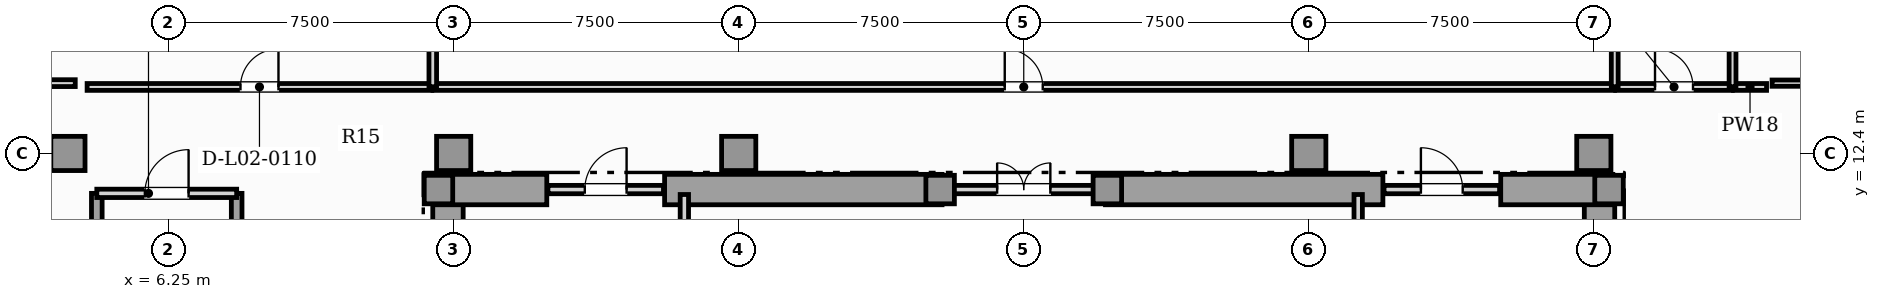
"""IFC4 building model, lengths in metres.
Left out: names, types, materials, properties, quantities, classifications, styles, units other than length and angle.
Written with IfcOpenShell. Run it as: python <this file> out.ifc"""

import sys

from ifc_helpers import new_model, si_unit, direction, frame, frame_2d, origin, origin_2d, place, context, subcontext, project, spatial, rectangle, extrude, element, fill, save


model = new_model("IFC4")
c1 = context("Model", 3, precision=1e-05, world=origin(), true_north=direction((0.0, 1.0)))
c2 = subcontext(c1, "Body", "Model", "MODEL_VIEW")
j1 = project(units=[si_unit("LENGTHUNIT", "METRE"), si_unit("PLANEANGLEUNIT", "RADIAN")], contexts=[c1])
p1 = place(None, origin())
s1 = spatial("IfcSite", under=j1, at=p1, CompositionType="ELEMENT")
p2 = place(p1, origin())
s2 = spatial("IfcBuilding", under=s1, at=p2, CompositionType="ELEMENT")
p3 = place(p2, frame((0.0, 0.0, 10.2)))
s3 = spatial("IfcBuildingStorey", under=s2, at=p3, CompositionType="ELEMENT", Elevation=10.2)
for number, where, z_axis, x_axis in (
    (1, (13.6, 0.92, 0.0), (0.0, 0.0, 1.0), (0.0, 1.0, 0.0)),
    (2, (43.9, 0.92, 0.0), (0.0, 0.0, 1.0), (0.0, 1.0, 0.0)),
):
    element("IfcWall", number, at=place(p3, frame(where, z_axis=z_axis, x_axis=x_axis)), inside=s3, PredefinedType="SHEAR", context=c2, shape_type="SweptSolid", body=[
        extrude(rectangle(XDim=10.53, YDim=0.8, at=frame_2d((5.265, 0.0))), origin(), (0.0, 0.0, 1.0), 4.52),
    ])
p4 = place(p3, frame((13.25, 11.45, 0.0), z_axis=(0.0, 0.0, 1.0), x_axis=(1.0, 0.0, 0.0)))
e3 = element("IfcWall", 3, at=p4, inside=s3, PredefinedType="SHEAR", context=c2, shape_type="SweptSolid", body=[
    extrude(rectangle(XDim=2.95, YDim=0.8, at=frame_2d((1.475, 0.0))), origin(), (0.0, 0.0, 1.0), 4.52),
])
for number, where, z_axis, x_axis in (
    (4, (19.3, 11.45, 0.0), (0.0, 0.0, 1.0), (1.0, 0.0, 0.0)),
    (5, (30.9, 11.45, 0.0), (0.0, 0.0, 1.0), (1.0, 0.0, 0.0)),
):
    element("IfcWall", number, at=place(p3, frame(where, z_axis=z_axis, x_axis=x_axis)), inside=s3, PredefinedType="SHEAR", context=c2, shape_type="SweptSolid", body=[
        extrude(rectangle(XDim=7.3, YDim=0.8, at=frame_2d((3.65, 0.0))), origin(), (0.0, 0.0, 1.0), 4.52),
    ])
p5 = place(p3, frame((41.3, 11.45, 0.0), z_axis=(0.0, 0.0, 1.0), x_axis=(1.0, 0.0, 0.0)))
e6 = element("IfcWall", 6, at=p5, inside=s3, PredefinedType="SHEAR", context=c2, shape_type="SweptSolid", body=[
    extrude(rectangle(XDim=2.95, YDim=0.8, at=frame_2d((1.475, 0.0))), origin(), (0.0, 0.0, 1.0), 4.52),
])
for number, where, z_axis, x_axis in (
    (7, (13.35, 11.45, 0.0), (0.0, 0.0, 1.0), (1.0, 0.0, 0.0)),
    (8, (44.15, 11.45, 0.0), (0.0, 0.0, 1.0), (1.0, 0.0, 0.0)),
    (9, (26.55, 11.45, 0.0), (0.0, 0.0, 1.0), (1.0, 0.0, 0.0)),
    (10, (30.95, 11.45, 0.0), (0.0, 0.0, 1.0), (1.0, 0.0, 0.0)),
):
    element("IfcColumn", number, at=place(p3, frame(where, z_axis=z_axis, x_axis=x_axis)), inside=s3, PredefinedType="COLUMN", context=c2, shape_type="SweptSolid", body=[
        extrude(rectangle(XDim=0.75, YDim=0.75, at=origin_2d()), origin(), (0.0, 0.0, 1.0), 4.8),
    ])
for number, where, z_axis, x_axis in (
    (11, (3.6, 12.4, 0.0), (0.0, 0.0, 1.0), (1.0, 0.0, 0.0)),
    (12, (13.75, 12.4, 0.0), (0.0, 0.0, 1.0), (1.0, 0.0, 0.0)),
    (13, (43.75, 12.4, 0.0), (0.0, 0.0, 1.0), (1.0, 0.0, 0.0)),
    (14, (21.25, 12.4, 0.0), (0.0, 0.0, 1.0), (1.0, 0.0, 0.0)),
    (15, (36.25, 12.4, 0.0), (0.0, 0.0, 1.0), (1.0, 0.0, 0.0)),
):
    element("IfcColumn", number, at=place(p3, frame(where, z_axis=z_axis, x_axis=x_axis)), inside=s3, PredefinedType="COLUMN", context=c2, shape_type="SweptSolid", body=[
        extrude(rectangle(XDim=0.9, YDim=0.9, at=origin_2d()), origin(), (0.0, 0.0, 1.0), 4.8),
    ])
for number, where, z_axis, x_axis in (
    (16, (4.36, 3.56, 0.0), (0.0, 0.0, 1.0), (0.0, 1.0, 0.0)),
    (17, (8.04, 3.56, 0.0), (0.0, 0.0, 1.0), (0.0, 1.0, 0.0)),
):
    element("IfcWall", number, at=place(p3, frame(where, z_axis=z_axis, x_axis=x_axis)), inside=s3, PredefinedType="SHEAR", context=c2, shape_type="SweptSolid", body=[
        extrude(rectangle(XDim=7.79, YDim=0.28, at=frame_2d((3.895, 0.0))), origin(), (0.0, 0.0, 1.0), 4.52),
    ])
p6 = place(p3, frame((4.36, 11.35, 0.0), z_axis=(0.0, 0.0, 1.0), x_axis=(1.0, 0.0, 0.0)))
e18 = element("IfcWall", 18, at=p6, inside=s3, PredefinedType="SOLIDWALL", context=c2, shape_type="SweptSolid", body=[
    extrude(rectangle(XDim=3.68, YDim=0.22, at=frame_2d((1.84, 0.0))), origin(), (0.0, 0.0, 1.0), 4.52),
])
p7 = place(p6, frame((1.265, 0.0, 0.0)))
e19 = element("IfcOpeningElement", 19, at=p7, cuts=e18, PredefinedType="OPENING", context=c2, shape_type="SweptSolid", body=[
    extrude(rectangle(XDim=1.15, YDim=2.2, at=frame_2d((0.575, 1.1))), frame((0.0, 0.12, 0.0), z_axis=(0.0, -1.0, 0.0), x_axis=(1.0, 0.0, 0.0)), (0.0, 0.0, 1.0), 0.24),
])
p8 = place(p3, frame((19.82, 8.52, 0.0), z_axis=(0.0, 0.0, 1.0), x_axis=(0.0, 1.0, 0.0)))
e20 = element("IfcWall", 20, at=p8, inside=s3, PredefinedType="SOLIDWALL", context=c2, shape_type="SweptSolid", body=[
    extrude(rectangle(XDim=2.8, YDim=0.22, at=frame_2d((1.4, 0.0))), origin(), (0.0, 0.0, 1.0), 3.976),
])
p9 = place(p8, frame((0.85, 0.0, 0.0)))
e21 = element("IfcOpeningElement", 21, at=p9, cuts=e20, PredefinedType="OPENING", context=c2, shape_type="SweptSolid", body=[
    extrude(rectangle(XDim=1.1, YDim=2.2, at=frame_2d((0.55, 1.1))), frame((0.0, 0.12, 0.0), z_axis=(0.0, -1.0, 0.0), x_axis=(1.0, 0.0, 0.0)), (0.0, 0.0, 1.0), 0.24),
])
p10 = place(p3, frame((37.55, 8.52, 0.0), z_axis=(0.0, 0.0, 1.0), x_axis=(0.0, 1.0, 0.0)))
e22 = element("IfcWall", 22, at=p10, inside=s3, PredefinedType="SOLIDWALL", context=c2, shape_type="SweptSolid", body=[
    extrude(rectangle(XDim=2.8, YDim=0.22, at=frame_2d((1.4, 0.0))), origin(), (0.0, 0.0, 1.0), 3.976),
])
p11 = place(p10, frame((0.85, 0.0, 0.0)))
e23 = element("IfcOpeningElement", 23, at=p11, cuts=e22, PredefinedType="OPENING", context=c2, shape_type="SweptSolid", body=[
    extrude(rectangle(XDim=1.1, YDim=2.2, at=frame_2d((0.55, 1.1))), frame((0.0, 0.12, 0.0), z_axis=(0.0, -1.0, 0.0), x_axis=(1.0, 0.0, 0.0)), (0.0, 0.0, 1.0), 0.24),
])
p12 = place(p3, frame((16.23, 11.45, 0.0), z_axis=(0.0, 0.0, 1.0), x_axis=(1.0, 0.0, 0.0)))
e24 = element("IfcWall", 24, at=p12, inside=s3, PredefinedType="SOLIDWALL", context=c2, shape_type="SweptSolid", body=[
    extrude(rectangle(XDim=3.04, YDim=0.22, at=frame_2d((1.52, 0.0))), origin(), (0.0, 0.0, 1.0), 4.52),
])
p13 = place(p12, frame((0.97, 0.0, 0.0)))
e25 = element("IfcOpeningElement", 25, at=p13, cuts=e24, PredefinedType="OPENING", context=c2, shape_type="SweptSolid", body=[
    extrude(rectangle(XDim=1.1, YDim=2.2, at=frame_2d((0.55, 1.1))), frame((0.0, 0.12, 0.0), z_axis=(0.0, -1.0, 0.0), x_axis=(1.0, 0.0, 0.0)), (0.0, 0.0, 1.0), 0.24),
])
p14 = place(p3, frame((26.63, 11.45, 0.0), z_axis=(0.0, 0.0, 1.0), x_axis=(1.0, 0.0, 0.0)))
e26 = element("IfcWall", 26, at=p14, inside=s3, PredefinedType="SOLIDWALL", context=c2, shape_type="SweptSolid", body=[
    extrude(rectangle(XDim=4.24, YDim=0.22, at=frame_2d((2.12, 0.0))), origin(), (0.0, 0.0, 1.0), 4.52),
])
p15 = place(p14, frame((1.42, 0.0, 0.0)))
e27 = element("IfcOpeningElement", 27, at=p15, cuts=e26, PredefinedType="OPENING", context=c2, shape_type="SweptSolid", body=[
    extrude(rectangle(XDim=1.4, YDim=2.2, at=frame_2d((0.7, 1.1))), frame((0.0, 0.12, 0.0), z_axis=(0.0, -1.0, 0.0), x_axis=(1.0, 0.0, 0.0)), (0.0, 0.0, 1.0), 0.24),
])
p16 = place(p3, frame((38.23, 11.45, 0.0), z_axis=(0.0, 0.0, 1.0), x_axis=(1.0, 0.0, 0.0)))
e28 = element("IfcWall", 28, at=p16, inside=s3, PredefinedType="SOLIDWALL", context=c2, shape_type="SweptSolid", body=[
    extrude(rectangle(XDim=3.04, YDim=0.22, at=frame_2d((1.52, 0.0))), origin(), (0.0, 0.0, 1.0), 4.52),
])
p17 = place(p16, frame((0.97, 0.0, 0.0)))
e29 = element("IfcOpeningElement", 29, at=p17, cuts=e28, PredefinedType="OPENING", context=c2, shape_type="SweptSolid", body=[
    extrude(rectangle(XDim=1.1, YDim=2.2, at=frame_2d((0.55, 1.1))), frame((0.0, 0.12, 0.0), z_axis=(0.0, -1.0, 0.0), x_axis=(1.0, 0.0, 0.0)), (0.0, 0.0, 1.0), 0.24),
])
p18 = place(p3, frame((13.205, 14.15, 0.0), z_axis=(0.0, 0.0, 1.0), x_axis=(1.0, 0.0, 0.0)))
e30 = element("IfcWall", 30, at=p18, inside=s3, PredefinedType="PARTITIONING", context=c2, shape_type="SweptSolid", body=[
    extrude(rectangle(XDim=31.09, YDim=0.18, at=frame_2d((15.545, 0.0))), origin(), (0.0, 0.0, 1.0), 4.52),
])
p19 = place(p18, frame((15.045, 0.0, 0.0)))
e31 = element("IfcOpeningElement", 31, at=p19, cuts=e30, PredefinedType="OPENING", context=c2, shape_type="SweptSolid", body=[
    extrude(rectangle(XDim=1.0, YDim=2.15, at=frame_2d((0.5, 1.075))), frame((0.0, 0.1, 0.0), z_axis=(0.0, -1.0, 0.0), x_axis=(1.0, 0.0, 0.0)), (0.0, 0.0, 1.0), 0.2),
])
p20 = place(p3, frame((4.105, 14.15, 0.0), z_axis=(0.0, 0.0, 1.0), x_axis=(1.0, 0.0, 0.0)))
e32 = element("IfcWall", 32, at=p20, inside=s3, PredefinedType="PARTITIONING", context=c2, shape_type="SweptSolid", body=[
    extrude(rectangle(XDim=9.07, YDim=0.18, at=frame_2d((4.535, 0.0))), origin(), (0.0, 0.0, 1.0), 4.52),
])
p21 = place(p20, frame((4.035, 0.0, 0.0)))
e33 = element("IfcOpeningElement", 33, at=p21, cuts=e32, PredefinedType="OPENING", context=c2, shape_type="SweptSolid", body=[
    extrude(rectangle(XDim=1.0, YDim=2.15, at=frame_2d((0.5, 1.075))), frame((0.0, 0.1, 0.0), z_axis=(0.0, -1.0, 0.0), x_axis=(1.0, 0.0, 0.0)), (0.0, 0.0, 1.0), 0.2),
])
p22 = place(p3, frame((44.325, 14.15, 0.0), z_axis=(0.0, 0.0, 1.0), x_axis=(1.0, 0.0, 0.0)))
e34 = element("IfcWall", 34, at=p22, inside=s3, PredefinedType="PARTITIONING", context=c2, shape_type="SweptSolid", body=[
    extrude(rectangle(XDim=3.07, YDim=0.18, at=frame_2d((1.535, 0.0))), origin(), (0.0, 0.0, 1.0), 4.52),
])
p23 = place(p22, frame((1.035, 0.0, 0.0)))
e35 = element("IfcOpeningElement", 35, at=p23, cuts=e34, PredefinedType="OPENING", context=c2, shape_type="SweptSolid", body=[
    extrude(rectangle(XDim=1.0, YDim=2.15, at=frame_2d((0.5, 1.075))), frame((0.0, 0.1, 0.0), z_axis=(0.0, -1.0, 0.0), x_axis=(1.0, 0.0, 0.0)), (0.0, 0.0, 1.0), 0.2),
])
p24 = place(p3, frame((47.425, 14.15, 0.0), z_axis=(0.0, 0.0, 1.0), x_axis=(1.0, 0.0, 0.0)))
e36 = element("IfcWall", 36, at=p24, inside=s3, PredefinedType="PARTITIONING", context=c2, shape_type="SweptSolid", body=[
    extrude(rectangle(XDim=0.87, YDim=0.18, at=frame_2d((0.435, 0.0))), origin(), (0.0, 0.0, 1.0), 4.52),
])
p25 = place(p3, frame((13.2, 14.155, 0.0), z_axis=(0.0, 0.0, 1.0), x_axis=(0.0, 1.0, 0.0)))
e37 = element("IfcWall", 37, at=p25, inside=s3, PredefinedType="PARTITIONING", context=c2, shape_type="SweptSolid", body=[
    extrude(rectangle(XDim=11.54, YDim=0.2, at=frame_2d((5.77, 0.0))), origin(), (0.0, 0.0, 1.0), 4.52),
])
p26 = place(p3, frame((44.3, 14.155, 0.0), z_axis=(0.0, 0.0, 1.0), x_axis=(0.0, 1.0, 0.0)))
e38 = element("IfcWall", 38, at=p26, inside=s3, PredefinedType="PARTITIONING", context=c2, shape_type="SweptSolid", body=[
    extrude(rectangle(XDim=11.54, YDim=0.18, at=frame_2d((5.77, 0.0))), origin(), (0.0, 0.0, 1.0), 4.52),
])
p27 = place(p26, frame((5.27, 0.0, 0.0)))
e39 = element("IfcOpeningElement", 39, at=p27, cuts=e38, PredefinedType="OPENING", context=c2, shape_type="SweptSolid", body=[
    extrude(rectangle(XDim=1.0, YDim=2.15, at=frame_2d((0.5, 1.075))), frame((0.0, 0.1, 0.0), z_axis=(0.0, -1.0, 0.0), x_axis=(1.0, 0.0, 0.0)), (0.0, 0.0, 1.0), 0.2),
])
p28 = place(p3, frame((47.4, 14.155, 0.0), z_axis=(0.0, 0.0, 1.0), x_axis=(0.0, 1.0, 0.0)))
e40 = element("IfcWall", 40, at=p28, inside=s3, PredefinedType="PARTITIONING", context=c2, shape_type="SweptSolid", body=[
    extrude(rectangle(XDim=3.79, YDim=0.18, at=frame_2d((1.895, 0.0))), origin(), (0.0, 0.0, 1.0), 4.52),
])
p29 = place(p28, frame((1.37, 0.0, 0.0)))
e41 = element("IfcOpeningElement", 41, at=p29, cuts=e40, PredefinedType="OPENING", context=c2, shape_type="SweptSolid", body=[
    extrude(rectangle(XDim=1.05, YDim=2.15, at=frame_2d((0.525, 1.075))), frame((0.0, 0.1, 0.0), z_axis=(0.0, -1.0, 0.0), x_axis=(1.0, 0.0, 0.0)), (0.0, 0.0, 1.0), 0.2),
])
p30 = place(p3, frame((-0.705, 14.25, 0.0), z_axis=(0.0, 0.0, 1.0), x_axis=(1.0, 0.0, 0.0)))
e42 = element("IfcWall", 42, at=p30, inside=s3, PredefinedType="PARTITIONING", context=c2, shape_type="SweptSolid", body=[
    extrude(rectangle(XDim=4.498, YDim=0.18, at=frame_2d((2.249, 0.0))), origin(), (0.0, 0.0, 1.0), 4.52),
])
p31 = place(p3, frame((48.44, 14.25, 0.0), z_axis=(0.0, 0.0, 1.0), x_axis=(1.0, 0.0, 0.0)))
e43 = element("IfcWall", 43, at=p31, inside=s3, PredefinedType="PLUMBINGWALL", context=c2, shape_type="SweptSolid", body=[
    extrude(rectangle(XDim=9.655, YDim=0.165, at=frame_2d((4.828, 0.0))), origin(), (0.0, 0.0, 1.0), 4.52),
])
p32 = place(p7, origin())
e44 = element("IfcDoor", 44, at=p32, inside=s3, OperationType="SINGLE_SWING_RIGHT", PredefinedType="DOOR", context=c2, shape_type="SweptSolid", body=[
    extrude(rectangle(XDim=1.15, YDim=2.2, at=frame_2d((0.575, 1.1))), frame((0.0, 0.025, 0.0), z_axis=(0.0, -1.0, 0.0), x_axis=(1.0, 0.0, 0.0)), (0.0, 0.0, 1.0), 0.05),
])
fill(e19, e44)
p33 = place(p13, origin())
e45 = element("IfcDoor", 45, at=p33, inside=s3, OperationType="SINGLE_SWING_RIGHT", PredefinedType="DOOR", context=c2, shape_type="SweptSolid", body=[
    extrude(rectangle(XDim=1.1, YDim=2.2, at=frame_2d((0.55, 1.1))), frame((0.0, 0.025, 0.0), z_axis=(0.0, -1.0, 0.0), x_axis=(1.0, 0.0, 0.0)), (0.0, 0.0, 1.0), 0.05),
])
fill(e25, e45)
p34 = place(p15, origin())
e46 = element("IfcDoor", 46, at=p34, inside=s3, OperationType="DOUBLE_DOOR_SINGLE_SWING", PredefinedType="DOOR", context=c2, shape_type="SweptSolid", body=[
    extrude(rectangle(XDim=1.4, YDim=2.2, at=frame_2d((0.7, 1.1))), frame((0.0, 0.025, 0.0), z_axis=(0.0, -1.0, 0.0), x_axis=(1.0, 0.0, 0.0)), (0.0, 0.0, 1.0), 0.05),
])
fill(e27, e46)
p35 = place(p17, origin())
e47 = element("IfcDoor", 47, at=p35, inside=s3, OperationType="SINGLE_SWING_LEFT", PredefinedType="DOOR", context=c2, shape_type="SweptSolid", body=[
    extrude(rectangle(XDim=1.1, YDim=2.2, at=frame_2d((0.55, 1.1))), frame((0.0, 0.025, 0.0), z_axis=(0.0, -1.0, 0.0), x_axis=(1.0, 0.0, 0.0)), (0.0, 0.0, 1.0), 0.05),
])
fill(e29, e47)
p36 = place(p19, origin())
e48 = element("IfcDoor", 48, at=p36, inside=s3, OperationType="SINGLE_SWING_LEFT", PredefinedType="DOOR", context=c2, shape_type="SweptSolid", body=[
    extrude(rectangle(XDim=1.0, YDim=2.15, at=frame_2d((0.5, 1.075))), frame((0.0, 0.025, 0.0), z_axis=(0.0, -1.0, 0.0), x_axis=(1.0, 0.0, 0.0)), (0.0, 0.0, 1.0), 0.05),
])
fill(e31, e48)
p37 = place(p21, origin())
e49 = element("IfcDoor", 49, at=p37, inside=s3, OperationType="SINGLE_SWING_RIGHT", PredefinedType="DOOR", context=c2, shape_type="SweptSolid", body=[
    extrude(rectangle(XDim=1.0, YDim=2.15, at=frame_2d((0.5, 1.075))), frame((0.0, 0.025, 0.0), z_axis=(0.0, -1.0, 0.0), x_axis=(1.0, 0.0, 0.0)), (0.0, 0.0, 1.0), 0.05),
])
fill(e33, e49)
p38 = place(p23, origin())
e50 = element("IfcDoor", 50, at=p38, inside=s3, OperationType="SINGLE_SWING_LEFT", PredefinedType="DOOR", context=c2, shape_type="SweptSolid", body=[
    extrude(rectangle(XDim=1.0, YDim=2.15, at=frame_2d((0.5, 1.075))), frame((0.0, 0.025, 0.0), z_axis=(0.0, -1.0, 0.0), x_axis=(1.0, 0.0, 0.0)), (0.0, 0.0, 1.0), 0.05),
])
fill(e35, e50)
save(model, sys.argv[1])
